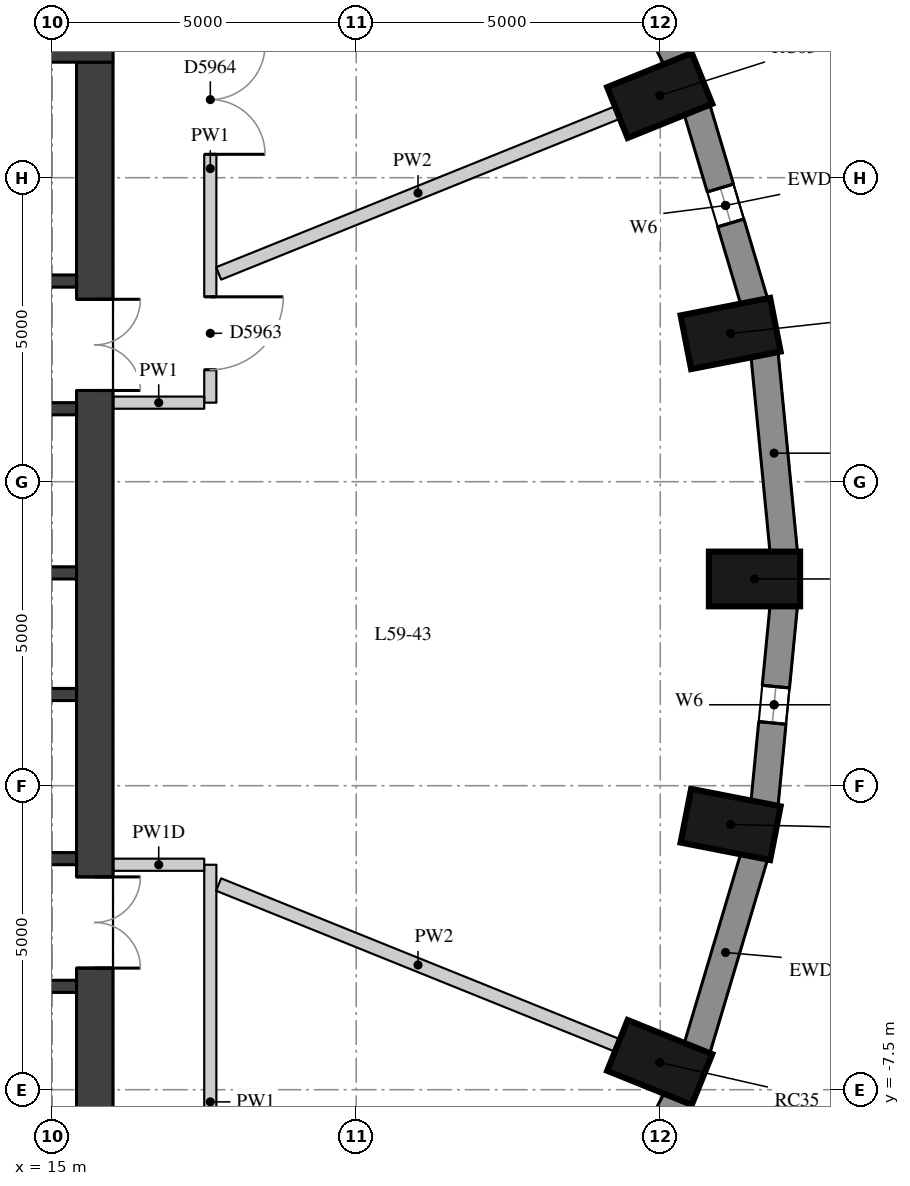
"""IFC4 building model, lengths in metres.
Left out: names, types, materials, properties, quantities, classifications, styles, units other than length and angle.
Written with IfcOpenShell. Run it as: python <this file> out.ifc"""

import sys

from ifc_helpers import new_model, si_unit, direction, frame, frame_2d, origin, origin_2d, place, context, subcontext, project, spatial, rectangle, extrude, element, fill, save


model = new_model("IFC4")
c1 = context("Model", 3, precision=1e-05, world=origin(), true_north=direction((0.0, 1.0)))
c2 = subcontext(c1, "Body", "Model", "MODEL_VIEW")
j1 = project(units=[si_unit("LENGTHUNIT", "METRE"), si_unit("PLANEANGLEUNIT", "RADIAN")], contexts=[c1])
p1 = place(None, origin())
s1 = spatial("IfcSite", under=j1, at=p1, CompositionType="ELEMENT")
p2 = place(p1, origin())
s2 = spatial("IfcBuilding", under=s1, at=p2, CompositionType="ELEMENT")
p3 = place(p2, frame((0.0, 0.0, 209.0)))
s3 = spatial("IfcBuildingStorey", under=s2, at=p3, CompositionType="ELEMENT", Elevation=209.0)
for number, where, z_axis, x_axis in (
    (1, (26.55, 0.9, 0.0), (0.0, 0.0, 1.0), (1.0, 0.0, 0.0)),
    (2, (26.157, 4.937, 0.0), (0.0, 0.0, 1.0), (0.981, 0.192, 0.0)),
    (3, (24.991, 8.852, 0.0), (0.0, 0.0, 1.0), (0.927, 0.374, 0.0)),
    (4, (24.991, -7.052, 0.0), (0.0, 0.0, 1.0), (0.927, -0.374, 0.0)),
    (5, (26.157, -3.137, 0.0), (0.0, 0.0, 1.0), (0.981, -0.192, 0.0)),
):
    element("IfcColumn", number, at=place(p3, frame(where, z_axis=z_axis, x_axis=x_axis)), inside=s3, PredefinedType="COLUMN", context=c2, shape_type="SweptSolid", body=[
        extrude(rectangle(XDim=1.5, YDim=0.9, at=origin_2d()), origin(), (0.0, 0.0, 1.0), 3.3),
    ])
p4 = place(p3, frame((27.032, 1.33, 0.0), z_axis=(0.0, 0.0, 1.0), x_axis=(-0.096824116835, 0.995301507283, 0.0)))
e6 = element("IfcWall", 6, at=p4, inside=s3, PredefinedType="SOLIDWALL", context=c2, shape_type="SweptSolid", body=[
    extrude(rectangle(XDim=3.293, YDim=0.45, at=frame_2d((1.646, 0.0))), origin(), (0.0, 0.0, 1.0), 3.02),
])
p5 = place(p3, frame((26.548, 5.452, 0.0), z_axis=(0.0, 0.0, 1.0), x_axis=(-0.285444972963, 0.958395099847, 0.0)))
e7 = element("IfcWall", 7, at=p5, inside=s3, PredefinedType="SOLIDWALL", context=c2, shape_type="SweptSolid", body=[
    extrude(rectangle(XDim=3.32, YDim=0.45, at=frame_2d((1.66, 0.0))), origin(), (0.0, 0.0, 1.0), 3.02),
])
p6 = place(p5, frame((1.36, 0.0, 0.4)))
e8 = element("IfcOpeningElement", 8, at=p6, cuts=e7, PredefinedType="OPENING", context=c2, shape_type="SweptSolid", body=[
    extrude(rectangle(XDim=0.6, YDim=1.75, at=frame_2d((0.3, 0.875))), frame((0.0, 0.235, 0.0), z_axis=(0.0, -1.0, 0.0), x_axis=(1.0, 0.0, 0.0)), (0.0, 0.0, 1.0), 0.47),
])
p7 = place(p3, frame((25.278, 9.432, 0.0), z_axis=(0.0, 0.0, 1.0), x_axis=(-0.460175500475, 0.887827972505, 0.0)))
e9 = element("IfcWall", 9, at=p7, inside=s3, PredefinedType="SOLIDWALL", context=c2, shape_type="SweptSolid", body=[
    extrude(rectangle(XDim=3.371, YDim=0.45, at=frame_2d((1.685, 0.0))), origin(), (0.0, 0.0, 1.0), 3.02),
])
p8 = place(p3, frame((23.727, -10.624, 0.0), z_axis=(0.0, 0.0, 1.0), x_axis=(0.460175500475, 0.887827972505, 0.0)))
e10 = element("IfcWall", 10, at=p8, inside=s3, PredefinedType="SOLIDWALL", context=c2, shape_type="SweptSolid", body=[
    extrude(rectangle(XDim=3.371, YDim=0.45, at=frame_2d((1.685, 0.0))), origin(), (0.0, 0.0, 1.0), 3.02),
])
p9 = place(p8, frame((1.385, 0.0, 0.4)))
e11 = element("IfcOpeningElement", 11, at=p9, cuts=e10, PredefinedType="OPENING", context=c2, shape_type="SweptSolid", body=[
    extrude(rectangle(XDim=0.6, YDim=1.75, at=frame_2d((0.3, 0.875))), frame((0.0, 0.235, 0.0), z_axis=(0.0, -1.0, 0.0), x_axis=(1.0, 0.0, 0.0)), (0.0, 0.0, 1.0), 0.47),
])
p10 = place(p3, frame((25.6, -6.834, 0.0), z_axis=(0.0, 0.0, 1.0), x_axis=(0.285444972963, 0.958395099847, 0.0)))
e12 = element("IfcWall", 12, at=p10, inside=s3, PredefinedType="SOLIDWALL", context=c2, shape_type="SweptSolid", body=[
    extrude(rectangle(XDim=3.32, YDim=0.45, at=frame_2d((1.66, 0.0))), origin(), (0.0, 0.0, 1.0), 3.02),
])
p11 = place(p3, frame((26.713, -2.808, 0.0), z_axis=(0.0, 0.0, 1.0), x_axis=(0.096816972749, 0.995302202242, 0.0)))
e13 = element("IfcWall", 13, at=p11, inside=s3, PredefinedType="SOLIDWALL", context=c2, shape_type="SweptSolid", body=[
    extrude(rectangle(XDim=3.293, YDim=0.45, at=frame_2d((1.646, 0.0))), origin(), (0.0, 0.0, 1.0), 3.02),
])
p12 = place(p11, frame((1.347, 0.0, 0.4)))
e14 = element("IfcOpeningElement", 14, at=p12, cuts=e13, PredefinedType="OPENING", context=c2, shape_type="SweptSolid", body=[
    extrude(rectangle(XDim=0.6, YDim=1.75, at=frame_2d((0.3, 0.875))), frame((0.0, 0.235, 0.0), z_axis=(0.0, -1.0, 0.0), x_axis=(1.0, 0.0, 0.0)), (0.0, 0.0, 1.0), 0.47),
])
p13 = place(p3, frame((15.7, -9.4, 0.0), z_axis=(0.0, 0.0, 1.0), x_axis=(0.0, 1.0, 0.0)))
e15 = element("IfcWall", 15, at=p13, inside=s3, PredefinedType="SHEAR", context=c2, shape_type="SweptSolid", body=[
    extrude(rectangle(XDim=18.8, YDim=0.6, at=frame_2d((9.4, 0.0))), origin(), (0.0, 0.0, 1.0), 3.02),
])
p14 = place(p13, frame((13.4, 0.0, 0.0)))
e16 = element("IfcOpeningElement", 16, at=p14, cuts=e15, PredefinedType="OPENING", context=c2, shape_type="SweptSolid", body=[
    extrude(rectangle(XDim=1.5, YDim=2.1, at=frame_2d((0.75, 1.05))), frame((0.0, 0.31, 0.0), z_axis=(0.0, -1.0, 0.0), x_axis=(1.0, 0.0, 0.0)), (0.0, 0.0, 1.0), 0.62),
])
p15 = place(p13, frame((3.9, 0.0, 0.0)))
e17 = element("IfcOpeningElement", 17, at=p15, cuts=e15, PredefinedType="OPENING", context=c2, shape_type="SweptSolid", body=[
    extrude(rectangle(XDim=1.5, YDim=2.1, at=frame_2d((0.75, 1.05))), frame((0.0, 0.31, 0.0), z_axis=(0.0, -1.0, 0.0), x_axis=(1.0, 0.0, 0.0)), (0.0, 0.0, 1.0), 0.62),
])
p16 = place(p3, frame((4.0, 9.7, 0.0), z_axis=(0.0, 0.0, 1.0), x_axis=(1.0, 0.0, 0.0)))
e18 = element("IfcWall", 18, at=p16, inside=s3, PredefinedType="SHEAR", context=c2, shape_type="SweptSolid", body=[
    extrude(rectangle(XDim=12.0, YDim=0.6, at=frame_2d((6.0, 0.0))), origin(), (0.0, 0.0, 1.0), 3.02),
])
p17 = place(p3, frame((4.6, 5.8, 0.0), z_axis=(0.0, 0.0, 1.0), x_axis=(1.0, 0.0, 0.0)))
e19 = element("IfcWall", 19, at=p17, inside=s3, PredefinedType="SHEAR", context=c2, shape_type="SweptSolid", body=[
    extrude(rectangle(XDim=10.8, YDim=0.2, at=frame_2d((5.4, 0.0))), origin(), (0.0, 0.0, 1.0), 3.02),
])
p18 = place(p17, frame((7.05, 0.0, 0.0)))
e20 = element("IfcOpeningElement", 20, at=p18, cuts=e19, PredefinedType="OPENING", context=c2, shape_type="SweptSolid", body=[
    extrude(rectangle(XDim=1.1, YDim=2.1, at=frame_2d((0.55, 1.05))), frame((0.0, 0.11, 0.0), z_axis=(0.0, -1.0, 0.0), x_axis=(1.0, 0.0, 0.0)), (0.0, 0.0, 1.0), 0.22),
])
p19 = place(p17, frame((9.05, 0.0, 0.0)))
e21 = element("IfcOpeningElement", 21, at=p19, cuts=e19, PredefinedType="OPENING", context=c2, shape_type="SweptSolid", body=[
    extrude(rectangle(XDim=1.1, YDim=2.1, at=frame_2d((0.55, 1.05))), frame((0.0, 0.11, 0.0), z_axis=(0.0, -1.0, 0.0), x_axis=(1.0, 0.0, 0.0)), (0.0, 0.0, 1.0), 0.22),
])
p20 = place(p3, frame((4.6, 3.7, 0.0), z_axis=(0.0, 0.0, 1.0), x_axis=(1.0, 0.0, 0.0)))
e22 = element("IfcWall", 22, at=p20, inside=s3, PredefinedType="SHEAR", context=c2, shape_type="SweptSolid", body=[
    extrude(rectangle(XDim=10.8, YDim=0.2, at=frame_2d((5.4, 0.0))), origin(), (0.0, 0.0, 1.0), 3.02),
])
p21 = place(p20, frame((6.6, 0.0, 0.0)))
e23 = element("IfcOpeningElement", 23, at=p21, cuts=e22, PredefinedType="OPENING", context=c2, shape_type="SweptSolid", body=[
    extrude(rectangle(XDim=1.1, YDim=2.1, at=frame_2d((0.55, 1.05))), frame((0.0, 0.11, 0.0), z_axis=(0.0, -1.0, 0.0), x_axis=(1.0, 0.0, 0.0)), (0.0, 0.0, 1.0), 0.22),
])
p22 = place(p20, frame((8.9, 0.0, 0.0)))
e24 = element("IfcOpeningElement", 24, at=p22, cuts=e22, PredefinedType="OPENING", context=c2, shape_type="SweptSolid", body=[
    extrude(rectangle(XDim=1.1, YDim=2.1, at=frame_2d((0.55, 1.05))), frame((0.0, 0.11, 0.0), z_axis=(0.0, -1.0, 0.0), x_axis=(1.0, 0.0, 0.0)), (0.0, 0.0, 1.0), 0.22),
])
for number, where, z_axis, x_axis in (
    (25, (4.6, 1.0, 0.0), (0.0, 0.0, 1.0), (1.0, 0.0, 0.0)),
    (26, (4.6, -1.0, 0.0), (0.0, 0.0, 1.0), (1.0, 0.0, 0.0)),
):
    element("IfcWall", number, at=place(p3, frame(where, z_axis=z_axis, x_axis=x_axis)), inside=s3, PredefinedType="SHEAR", context=c2, shape_type="SweptSolid", body=[
        extrude(rectangle(XDim=10.8, YDim=0.2, at=frame_2d((5.4, 0.0))), origin(), (0.0, 0.0, 1.0), 3.02),
    ])
p23 = place(p3, frame((4.6, -3.7, 0.0), z_axis=(0.0, 0.0, 1.0), x_axis=(1.0, 0.0, 0.0)))
e27 = element("IfcWall", 27, at=p23, inside=s3, PredefinedType="SHEAR", context=c2, shape_type="SweptSolid", body=[
    extrude(rectangle(XDim=10.8, YDim=0.2, at=frame_2d((5.4, 0.0))), origin(), (0.0, 0.0, 1.0), 3.02),
])
p24 = place(p23, frame((6.6, 0.0, 0.0)))
e28 = element("IfcOpeningElement", 28, at=p24, cuts=e27, PredefinedType="OPENING", context=c2, shape_type="SweptSolid", body=[
    extrude(rectangle(XDim=1.1, YDim=2.1, at=frame_2d((0.55, 1.05))), frame((0.0, 0.11, 0.0), z_axis=(0.0, -1.0, 0.0), x_axis=(1.0, 0.0, 0.0)), (0.0, 0.0, 1.0), 0.22),
])
p25 = place(p23, frame((8.9, 0.0, 0.0)))
e29 = element("IfcOpeningElement", 29, at=p25, cuts=e27, PredefinedType="OPENING", context=c2, shape_type="SweptSolid", body=[
    extrude(rectangle(XDim=1.1, YDim=2.1, at=frame_2d((0.55, 1.05))), frame((0.0, 0.11, 0.0), z_axis=(0.0, -1.0, 0.0), x_axis=(1.0, 0.0, 0.0)), (0.0, 0.0, 1.0), 0.22),
])
p26 = place(p3, frame((4.6, -5.8, 0.0), z_axis=(0.0, 0.0, 1.0), x_axis=(1.0, 0.0, 0.0)))
e30 = element("IfcWall", 30, at=p26, inside=s3, PredefinedType="SHEAR", context=c2, shape_type="SweptSolid", body=[
    extrude(rectangle(XDim=10.8, YDim=0.2, at=frame_2d((5.4, 0.0))), origin(), (0.0, 0.0, 1.0), 3.02),
])
p27 = place(p3, frame((17.6, -3.8, 0.0), z_axis=(0.0, 0.0, 1.0), x_axis=(0.0, -1.0, 0.0)))
e31 = element("IfcWall", 31, at=p27, inside=s3, PredefinedType="PARTITIONING", context=c2, shape_type="SweptSolid", body=[
    extrude(rectangle(XDim=7.8, YDim=0.2, at=frame_2d((3.9, 0.0))), origin(), (0.0, 0.0, 1.0), 3.02),
])
p28 = place(p3, frame((17.6, 11.5, 0.0), z_axis=(0.0, 0.0, 1.0), x_axis=(0.0, -1.0, 0.0)))
e32 = element("IfcWall", 32, at=p28, inside=s3, PredefinedType="PARTITIONING", context=c2, shape_type="SweptSolid", body=[
    extrude(rectangle(XDim=7.7, YDim=0.2, at=frame_2d((3.85, 0.0))), origin(), (0.0, 0.0, 1.0), 3.02),
])
p29 = place(p28, frame((5.959, 0.0, 0.0)))
e33 = element("IfcOpeningElement", 33, at=p29, cuts=e32, PredefinedType="OPENING", context=c2, shape_type="SweptSolid", body=[
    extrude(rectangle(XDim=1.2, YDim=2.1, at=frame_2d((0.6, 1.05))), frame((0.0, 0.11, 0.0), z_axis=(0.0, -1.0, 0.0), x_axis=(1.0, 0.0, 0.0)), (0.0, 0.0, 1.0), 0.22),
])
p30 = place(p28, frame((1.815, 0.0, 0.0)))
e34 = element("IfcOpeningElement", 34, at=p30, cuts=e32, PredefinedType="OPENING", context=c2, shape_type="SweptSolid", body=[
    extrude(rectangle(XDim=1.8, YDim=2.1, at=frame_2d((0.9, 1.05))), frame((0.0, 0.11, 0.0), z_axis=(0.0, -1.0, 0.0), x_axis=(1.0, 0.0, 0.0)), (0.0, 0.0, 1.0), 0.22),
])
p31 = place(p3, frame((17.5, 3.8, 0.0), z_axis=(0.0, 0.0, 1.0), x_axis=(-1.0, 0.0, 0.0)))
e35 = element("IfcWall", 35, at=p31, inside=s3, PredefinedType="PARTITIONING", context=c2, shape_type="SweptSolid", body=[
    extrude(rectangle(XDim=1.496, YDim=0.2, at=frame_2d((0.748, 0.0))), origin(), (0.0, 0.0, 1.0), 3.02),
])
p32 = place(p3, frame((16.004, -3.8, 0.0), z_axis=(0.0, 0.0, 1.0), x_axis=(1.0, 0.0, 0.0)))
e36 = element("IfcWall", 36, at=p32, inside=s3, PredefinedType="PARTITIONING", context=c2, shape_type="SweptSolid", body=[
    extrude(rectangle(XDim=1.496, YDim=0.2, at=frame_2d((0.748, 0.0))), origin(), (0.0, 0.0, 1.0), 2.47),
])
p33 = place(p3, frame((24.295, 8.571, 0.0), z_axis=(0.0, 0.0, 1.0), x_axis=(-0.927386999215, -0.374103399728, 0.0)))
e37 = element("IfcWall", 37, at=p33, inside=s3, PredefinedType="PARTITIONING", context=c2, shape_type="SweptSolid", body=[
    extrude(rectangle(XDim=7.072, YDim=0.22, at=frame_2d((3.536, 0.0))), origin(), (0.0, 0.0, 1.0), 3.02),
])
p34 = place(p3, frame((24.295, -6.771, 0.0), z_axis=(0.0, 0.0, 1.0), x_axis=(-0.927375021142, 0.374133091509, 0.0)))
e38 = element("IfcWall", 38, at=p34, inside=s3, PredefinedType="PARTITIONING", context=c2, shape_type="SweptSolid", body=[
    extrude(rectangle(XDim=7.072, YDim=0.22, at=frame_2d((3.536, 0.0))), origin(), (0.0, 0.0, 1.0), 3.02),
])
p35 = place(p6, origin())
e39 = element("IfcWindow", 39, at=p35, inside=s3, PartitioningType="SINGLE_PANEL", PredefinedType="WINDOW", context=c2, shape_type="SweptSolid", body=[
    extrude(rectangle(XDim=0.6, YDim=1.75, at=frame_2d((0.3, 0.875))), frame((0.0, 0.035, 0.0), z_axis=(0.0, -1.0, 0.0), x_axis=(1.0, 0.0, 0.0)), (0.0, 0.0, 1.0), 0.06),
])
fill(e8, e39)
p36 = place(p12, origin())
e40 = element("IfcWindow", 40, at=p36, inside=s3, PartitioningType="SINGLE_PANEL", PredefinedType="WINDOW", context=c2, shape_type="SweptSolid", body=[
    extrude(rectangle(XDim=0.6, YDim=1.75, at=frame_2d((0.3, 0.875))), frame((0.0, 0.035, 0.0), z_axis=(0.0, -1.0, 0.0), x_axis=(1.0, 0.0, 0.0)), (0.0, 0.0, 1.0), 0.06),
])
fill(e14, e40)
p37 = place(p14, origin())
e41 = element("IfcDoor", 41, at=p37, inside=s3, OperationType="DOUBLE_DOOR_SINGLE_SWING", PredefinedType="DOOR", context=c2, shape_type="SweptSolid", body=[
    extrude(rectangle(XDim=1.5, YDim=2.1, at=frame_2d((0.75, 1.05))), frame((0.0, 0.025, 0.0), z_axis=(0.0, -1.0, 0.0), x_axis=(1.0, 0.0, 0.0)), (0.0, 0.0, 1.0), 0.05),
])
fill(e16, e41)
p38 = place(p15, origin())
e42 = element("IfcDoor", 42, at=p38, inside=s3, OperationType="DOUBLE_DOOR_SINGLE_SWING", PredefinedType="DOOR", context=c2, shape_type="SweptSolid", body=[
    extrude(rectangle(XDim=1.5, YDim=2.1, at=frame_2d((0.75, 1.05))), frame((0.0, 0.025, 0.0), z_axis=(0.0, -1.0, 0.0), x_axis=(1.0, 0.0, 0.0)), (0.0, 0.0, 1.0), 0.05),
])
fill(e17, e42)
p39 = place(p29, origin())
e43 = element("IfcDoor", 43, at=p39, inside=s3, OperationType="SINGLE_SWING_LEFT", PredefinedType="DOOR", context=c2, shape_type="SweptSolid", body=[
    extrude(rectangle(XDim=1.2, YDim=2.1, at=frame_2d((0.6, 1.05))), frame((0.0, 0.025, 0.0), z_axis=(0.0, -1.0, 0.0), x_axis=(1.0, 0.0, 0.0)), (0.0, 0.0, 1.0), 0.05),
])
fill(e33, e43)
p40 = place(p30, origin())
e44 = element("IfcDoor", 44, at=p40, inside=s3, OperationType="DOUBLE_DOOR_SINGLE_SWING", PredefinedType="DOOR", context=c2, shape_type="SweptSolid", body=[
    extrude(rectangle(XDim=1.8, YDim=2.1, at=frame_2d((0.9, 1.05))), frame((0.0, 0.025, 0.0), z_axis=(0.0, -1.0, 0.0), x_axis=(1.0, 0.0, 0.0)), (0.0, 0.0, 1.0), 0.05),
])
fill(e34, e44)
save(model, sys.argv[1])
